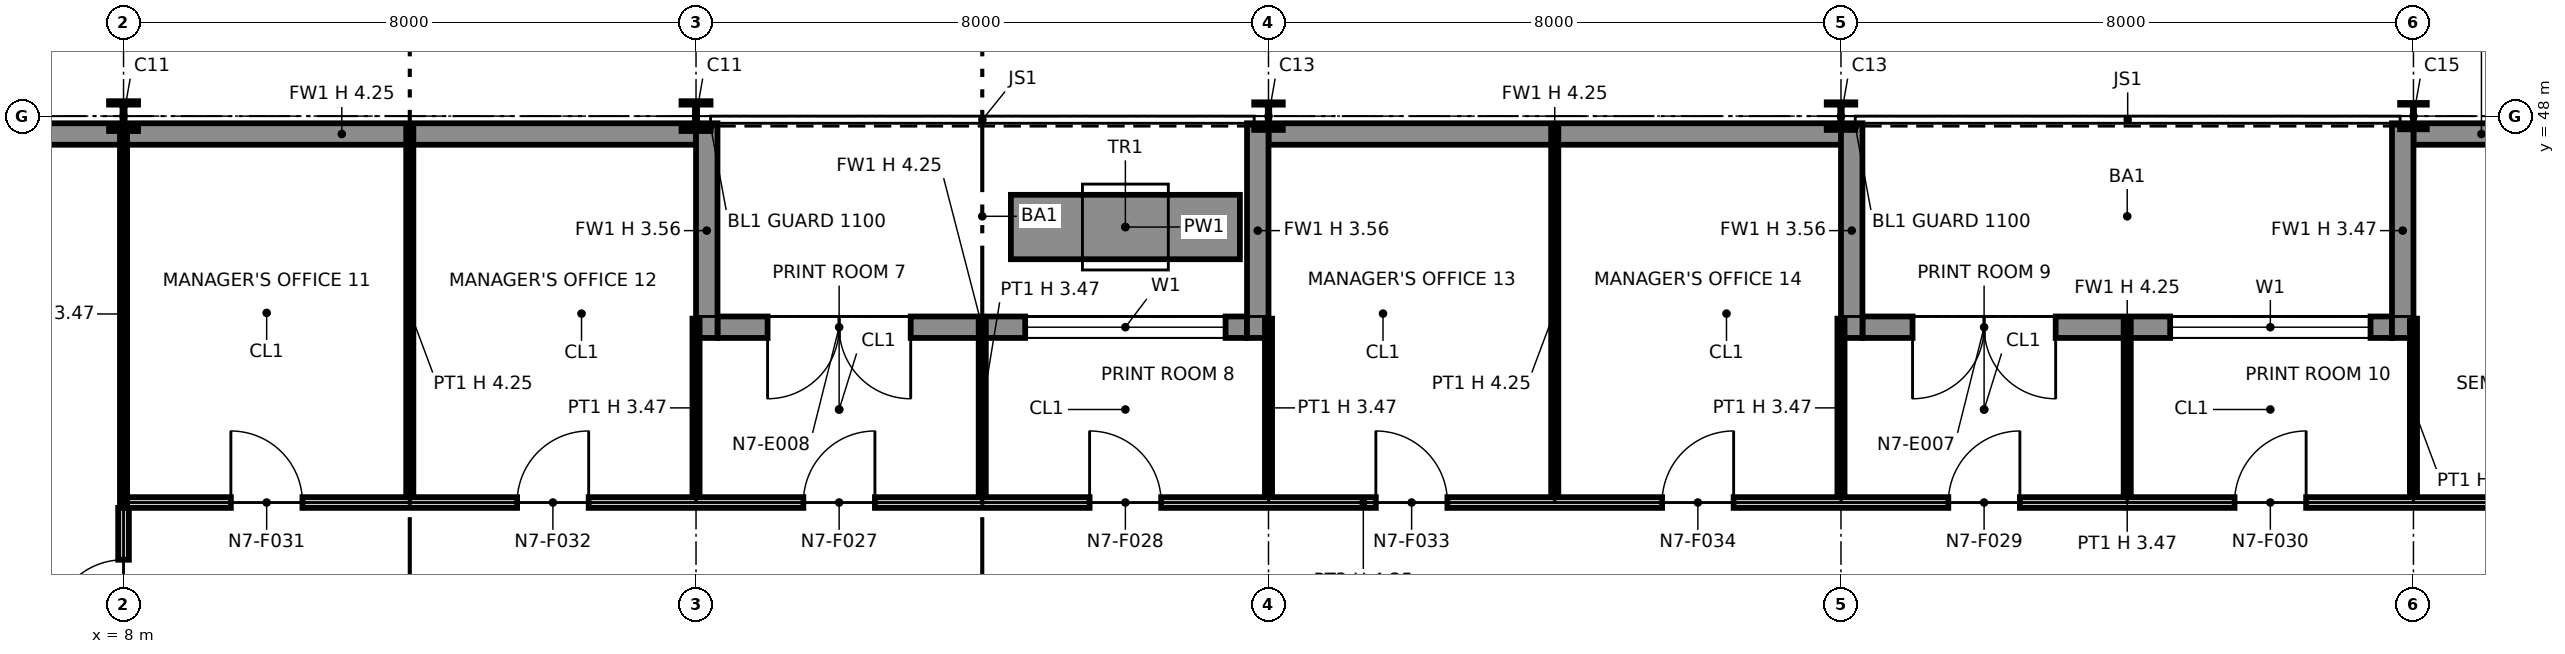
"""IFC4 building model, lengths in metres.
Left out: names, types, materials, properties, quantities, classifications, styles, units other than length and angle.
Written with IfcOpenShell. Run it as: python <this file> out.ifc"""

import sys

from ifc_helpers import new_model, si_unit, direction, frame, frame_2d, origin, origin_2d, place, context, subcontext, project, spatial, polyline, rectangle, i_section, outline, extrude, element, fill, save


model = new_model("IFC4")
c1 = context("Model", 3, precision=1e-05, world=origin(), true_north=direction((0.0, 1.0)))
c2 = subcontext(c1, "Body", "Model", "MODEL_VIEW")
j1 = project(units=[si_unit("LENGTHUNIT", "METRE"), si_unit("PLANEANGLEUNIT", "RADIAN")], contexts=[c1])
p1 = place(None, origin())
s1 = spatial("IfcSite", under=j1, at=p1, CompositionType="ELEMENT")
p2 = place(p1, origin())
s2 = spatial("IfcBuilding", under=s1, at=p2, CompositionType="ELEMENT")
p3 = place(p2, frame((0.0, 0.0, 105.2)))
s3 = spatial("IfcBuildingStorey", under=s2, at=p3, CompositionType="ELEMENT", Elevation=105.2)
for number, where, z_axis, x_axis in (
    (1, (8.0, 48.0, 0.0), (0.0, 0.0, 1.0), (1.0, 0.0, 0.0)),
    (2, (16.0, 48.0, 0.0), (0.0, 0.0, 1.0), (1.0, 0.0, 0.0)),
):
    element("IfcColumn", number, at=place(p3, frame(where, z_axis=z_axis, x_axis=x_axis)), inside=s3, PredefinedType="COLUMN", context=c2, shape_type="SweptSolid", body=[
        extrude(i_section(OverallWidth=0.406, OverallDepth=0.417, WebThickness=0.03, FlangeThickness=0.048, at=origin_2d()), origin(), (0.0, 0.0, 1.0), 4.25),
    ])
for number, where, z_axis, x_axis in (
    (3, (24.0, 48.0, 0.0), (0.0, 0.0, 1.0), (1.0, 0.0, 0.0)),
    (4, (32.0, 48.0, 0.0), (0.0, 0.0, 1.0), (1.0, 0.0, 0.0)),
):
    element("IfcColumn", number, at=place(p3, frame(where, z_axis=z_axis, x_axis=x_axis)), inside=s3, PredefinedType="COLUMN", context=c2, shape_type="SweptSolid", body=[
        extrude(i_section(OverallWidth=0.399, OverallDepth=0.386, WebThickness=0.021, FlangeThickness=0.033, at=origin_2d()), origin(), (0.0, 0.0, 1.0), 4.25),
    ])
p4 = place(p3, frame((40.0, 48.0, 0.0), z_axis=(0.0, 0.0, 1.0), x_axis=(1.0, 0.0, 0.0)))
e5 = element("IfcColumn", 5, at=p4, inside=s3, PredefinedType="COLUMN", context=c2, shape_type="SweptSolid", body=[
    extrude(i_section(OverallWidth=0.373, OverallDepth=0.368, WebThickness=0.015, FlangeThickness=0.024, at=origin_2d()), origin(), (0.0, 0.0, 1.0), 4.25),
])
p5 = place(p3, frame((41.9, 47.75, 0.0), z_axis=(0.0, 0.0, 1.0), x_axis=(-1.0, 0.0, 0.0)))
e6 = element("IfcWall", 6, at=p5, inside=s3, PredefinedType="SOLIDWALL", context=c2, shape_type="SweptSolid", body=[
    extrude(rectangle(XDim=1.9, YDim=0.3, at=frame_2d((0.95, 0.0))), origin(), (0.0, 0.0, 1.0), 4.25),
])
p6 = place(p3, frame((39.7, 45.05, 0.0), z_axis=(0.0, 0.0, 1.0), x_axis=(-1.0, 0.0, 0.0)))
e7 = element("IfcWall", 7, at=p6, inside=s3, PredefinedType="SOLIDWALL", context=c2, shape_type="SweptSolid", body=[
    extrude(rectangle(XDim=7.4, YDim=0.3, at=frame_2d((3.7, 0.0))), origin(), (0.0, 0.0, 1.0), 4.25),
])
p7 = place(p6, frame((0.3, 0.0, 0.9)))
e8 = element("IfcOpeningElement", 8, at=p7, cuts=e7, PredefinedType="OPENING", context=c2, shape_type="SweptSolid", body=[
    extrude(rectangle(XDim=2.8, YDim=2.2, at=frame_2d((1.4, 1.1))), frame((0.0, 0.16, 0.0), z_axis=(0.0, -1.0, 0.0), x_axis=(1.0, 0.0, 0.0)), (0.0, 0.0, 1.0), 0.32),
])
p8 = place(p6, frame((4.7, 0.0, 0.0)))
e9 = element("IfcOpeningElement", 9, at=p8, cuts=e7, PredefinedType="OPENING", context=c2, shape_type="SweptSolid", body=[
    extrude(rectangle(XDim=2.0, YDim=2.4, at=frame_2d((1.0, 1.2))), frame((0.0, 0.16, 0.0), z_axis=(0.0, -1.0, 0.0), x_axis=(1.0, 0.0, 0.0)), (0.0, 0.0, 1.0), 0.32),
])
p9 = place(p3, frame((39.85, 47.9, 0.0), z_axis=(0.0, 0.0, 1.0), x_axis=(0.0, -1.0, 0.0)))
e10 = element("IfcWall", 10, at=p9, inside=s3, PredefinedType="SOLIDWALL", context=c2, shape_type="SweptSolid", body=[
    extrude(rectangle(XDim=3.0, YDim=0.3, at=frame_2d((1.5, 0.0))), origin(), (0.0, 0.0, 1.0), 3.469),
])
p10 = place(p3, frame((32.15, 47.9, 0.0), z_axis=(0.0, 0.0, 1.0), x_axis=(0.0, -1.0, 0.0)))
e11 = element("IfcWall", 11, at=p10, inside=s3, PredefinedType="SOLIDWALL", context=c2, shape_type="SweptSolid", body=[
    extrude(rectangle(XDim=3.0, YDim=0.3, at=frame_2d((1.5, 0.0))), origin(), (0.0, 0.0, 1.0), 3.556),
])
p11 = place(p3, frame((32.0, 47.75, 0.0), z_axis=(0.0, 0.0, 1.0), x_axis=(-1.0, 0.0, 0.0)))
e12 = element("IfcWall", 12, at=p11, inside=s3, PredefinedType="SOLIDWALL", context=c2, shape_type="SweptSolid", body=[
    extrude(rectangle(XDim=8.0, YDim=0.3, at=frame_2d((4.0, 0.0))), origin(), (0.0, 0.0, 1.0), 4.25),
])
p12 = place(p3, frame((23.7, 45.05, 0.0), z_axis=(0.0, 0.0, 1.0), x_axis=(-1.0, 0.0, 0.0)))
e13 = element("IfcWall", 13, at=p12, inside=s3, PredefinedType="SOLIDWALL", context=c2, shape_type="SweptSolid", body=[
    extrude(rectangle(XDim=7.4, YDim=0.3, at=frame_2d((3.7, 0.0))), origin(), (0.0, 0.0, 1.0), 4.25),
])
p13 = place(p12, frame((0.3, 0.0, 0.9)))
e14 = element("IfcOpeningElement", 14, at=p13, cuts=e13, PredefinedType="OPENING", context=c2, shape_type="SweptSolid", body=[
    extrude(rectangle(XDim=2.8, YDim=2.2, at=frame_2d((1.4, 1.1))), frame((0.0, 0.16, 0.0), z_axis=(0.0, -1.0, 0.0), x_axis=(1.0, 0.0, 0.0)), (0.0, 0.0, 1.0), 0.32),
])
p14 = place(p12, frame((4.7, 0.0, 0.0)))
e15 = element("IfcOpeningElement", 15, at=p14, cuts=e13, PredefinedType="OPENING", context=c2, shape_type="SweptSolid", body=[
    extrude(rectangle(XDim=2.0, YDim=2.4, at=frame_2d((1.0, 1.2))), frame((0.0, 0.16, 0.0), z_axis=(0.0, -1.0, 0.0), x_axis=(1.0, 0.0, 0.0)), (0.0, 0.0, 1.0), 0.32),
])
for number, where, z_axis, x_axis in (
    (16, (23.85, 47.9, 0.0), (0.0, 0.0, 1.0), (0.0, -1.0, 0.0)),
    (17, (16.15, 47.9, 0.0), (0.0, 0.0, 1.0), (0.0, -1.0, 0.0)),
):
    element("IfcWall", number, at=place(p3, frame(where, z_axis=z_axis, x_axis=x_axis)), inside=s3, PredefinedType="SOLIDWALL", context=c2, shape_type="SweptSolid", body=[
        extrude(rectangle(XDim=3.0, YDim=0.3, at=frame_2d((1.5, 0.0))), origin(), (0.0, 0.0, 1.0), 3.556),
    ])
p15 = place(p3, frame((16.0, 47.75, 0.0), z_axis=(0.0, 0.0, 1.0), x_axis=(-1.0, 0.0, 0.0)))
e18 = element("IfcWall", 18, at=p15, inside=s3, PredefinedType="SOLIDWALL", context=c2, shape_type="SweptSolid", body=[
    extrude(rectangle(XDim=9.9, YDim=0.3, at=frame_2d((4.95, 0.0))), origin(), (0.0, 0.0, 1.0), 4.25),
])
p16 = place(p3, frame((23.6, 46.45, 0.0), z_axis=(0.0, 0.0, 1.0), x_axis=(-1.0, 0.0, 0.0)))
e19 = element("IfcWall", 19, at=p16, inside=s3, PredefinedType="SOLIDWALL", context=c2, shape_type="SweptSolid", body=[
    extrude(rectangle(XDim=3.2, YDim=0.9, at=frame_2d((1.6, 0.0))), origin(), (0.0, 0.0, 1.0), 0.6),
])
p17 = place(p3, frame((8.0, 40.03, 0.0), z_axis=(0.0, 0.0, 1.0), x_axis=(0.0, 1.0, 0.0)))
e20 = element("IfcWall", 20, at=p17, inside=s3, PredefinedType="PARTITIONING", context=c2, shape_type="SweptSolid", body=[
    extrude(rectangle(XDim=2.495, YDim=0.15, at=frame_2d((1.248, 0.0))), origin(), (0.0, 0.0, 1.0), 3.47),
])
p18 = place(p17, frame((0.77, 0.0, 0.0)))
e21 = element("IfcOpeningElement", 21, at=p18, cuts=e20, PredefinedType="OPENING", context=c2, shape_type="SweptSolid", body=[
    extrude(rectangle(XDim=1.0, YDim=2.1, at=frame_2d((0.5, 1.05))), frame((0.0, 0.085, 0.0), z_axis=(0.0, -1.0, 0.0), x_axis=(1.0, 0.0, 0.0)), (0.0, 0.0, 1.0), 0.17),
])
p19 = place(p3, frame((8.05, 42.6, 0.0), z_axis=(0.0, 0.0, 1.0), x_axis=(1.0, 0.0, 0.0)))
e22 = element("IfcWall", 22, at=p19, inside=s3, PredefinedType="PARTITIONING", context=c2, shape_type="SweptSolid", body=[
    extrude(rectangle(XDim=34.55, YDim=0.15, at=frame_2d((17.275, 0.0))), origin(), (0.0, 0.0, 1.0), 4.25),
])
p20 = place(p19, frame((9.45, 0.0, 0.0)))
e23 = element("IfcOpeningElement", 23, at=p20, cuts=e22, PredefinedType="OPENING", context=c2, shape_type="SweptSolid", body=[
    extrude(rectangle(XDim=1.0, YDim=2.1, at=frame_2d((0.5, 1.05))), frame((0.0, 0.085, 0.0), z_axis=(0.0, -1.0, 0.0), x_axis=(1.0, 0.0, 0.0)), (0.0, 0.0, 1.0), 0.17),
])
p21 = place(p19, frame((13.45, 0.0, 0.0)))
e24 = element("IfcOpeningElement", 24, at=p21, cuts=e22, PredefinedType="OPENING", context=c2, shape_type="SweptSolid", body=[
    extrude(rectangle(XDim=1.0, YDim=2.1, at=frame_2d((0.5, 1.05))), frame((0.0, 0.085, 0.0), z_axis=(0.0, -1.0, 0.0), x_axis=(1.0, 0.0, 0.0)), (0.0, 0.0, 1.0), 0.17),
])
p22 = place(p19, frame((25.45, 0.0, 0.0)))
e25 = element("IfcOpeningElement", 25, at=p22, cuts=e22, PredefinedType="OPENING", context=c2, shape_type="SweptSolid", body=[
    extrude(rectangle(XDim=1.0, YDim=2.1, at=frame_2d((0.5, 1.05))), frame((0.0, 0.085, 0.0), z_axis=(0.0, -1.0, 0.0), x_axis=(1.0, 0.0, 0.0)), (0.0, 0.0, 1.0), 0.17),
])
p23 = place(p19, frame((29.45, 0.0, 0.0)))
e26 = element("IfcOpeningElement", 26, at=p23, cuts=e22, PredefinedType="OPENING", context=c2, shape_type="SweptSolid", body=[
    extrude(rectangle(XDim=1.0, YDim=2.1, at=frame_2d((0.5, 1.05))), frame((0.0, 0.085, 0.0), z_axis=(0.0, -1.0, 0.0), x_axis=(1.0, 0.0, 0.0)), (0.0, 0.0, 1.0), 0.17),
])
p24 = place(p19, frame((1.45, 0.0, 0.0)))
e27 = element("IfcOpeningElement", 27, at=p24, cuts=e22, PredefinedType="OPENING", context=c2, shape_type="SweptSolid", body=[
    extrude(rectangle(XDim=1.0, YDim=2.1, at=frame_2d((0.5, 1.05))), frame((0.0, 0.085, 0.0), z_axis=(0.0, -1.0, 0.0), x_axis=(1.0, 0.0, 0.0)), (0.0, 0.0, 1.0), 0.17),
])
p25 = place(p19, frame((5.45, 0.0, 0.0)))
e28 = element("IfcOpeningElement", 28, at=p25, cuts=e22, PredefinedType="OPENING", context=c2, shape_type="SweptSolid", body=[
    extrude(rectangle(XDim=1.0, YDim=2.1, at=frame_2d((0.5, 1.05))), frame((0.0, 0.085, 0.0), z_axis=(0.0, -1.0, 0.0), x_axis=(1.0, 0.0, 0.0)), (0.0, 0.0, 1.0), 0.17),
])
p26 = place(p19, frame((17.45, 0.0, 0.0)))
e29 = element("IfcOpeningElement", 29, at=p26, cuts=e22, PredefinedType="OPENING", context=c2, shape_type="SweptSolid", body=[
    extrude(rectangle(XDim=1.0, YDim=2.1, at=frame_2d((0.5, 1.05))), frame((0.0, 0.085, 0.0), z_axis=(0.0, -1.0, 0.0), x_axis=(1.0, 0.0, 0.0)), (0.0, 0.0, 1.0), 0.17),
])
p27 = place(p19, frame((21.45, 0.0, 0.0)))
e30 = element("IfcOpeningElement", 30, at=p27, cuts=e22, PredefinedType="OPENING", context=c2, shape_type="SweptSolid", body=[
    extrude(rectangle(XDim=1.0, YDim=2.1, at=frame_2d((0.5, 1.05))), frame((0.0, 0.085, 0.0), z_axis=(0.0, -1.0, 0.0), x_axis=(1.0, 0.0, 0.0)), (0.0, 0.0, 1.0), 0.17),
])
p28 = place(p3, frame((8.0, 42.6, 0.0), z_axis=(0.0, 0.0, 1.0), x_axis=(0.0, 1.0, 0.0)))
e31 = element("IfcWall", 31, at=p28, inside=s3, PredefinedType="PARTITIONING", context=c2, shape_type="SweptSolid", body=[
    extrude(rectangle(XDim=5.27, YDim=0.1, at=frame_2d((2.635, 0.0))), origin(), (0.0, 0.0, 1.0), 3.47),
])
p29 = place(p3, frame((12.0, 42.675, 0.0), z_axis=(0.0, 0.0, 1.0), x_axis=(0.0, 1.0, 0.0)))
e32 = element("IfcWall", 32, at=p29, inside=s3, PredefinedType="PARTITIONING", context=c2, shape_type="SweptSolid", body=[
    extrude(outline(polyline([(0.0, 0.0), (5.195, 0.0), (5.195, 4.25), (1.625, 4.25), (1.623, 3.47), (1.027, 3.47), (1.025, 4.25), (0.0, 4.25), (0.0, 0.0)])), frame((0.0, 0.05, 0.0), z_axis=(0.0, -1.0, 0.0), x_axis=(1.0, 0.0, 0.0)), (0.0, 0.0, 1.0), 0.1),
])
for number, where, z_axis, x_axis in (
    (33, (16.0, 42.675, 0.0), (0.0, 0.0, 1.0), (0.0, 1.0, 0.0)),
    (34, (20.0, 42.675, 0.0), (0.0, 0.0, 1.0), (0.0, 1.0, 0.0)),
    (35, (24.0, 42.675, 0.0), (0.0, 0.0, 1.0), (0.0, 1.0, 0.0)),
):
    element("IfcWall", number, at=place(p3, frame(where, z_axis=z_axis, x_axis=x_axis)), inside=s3, PredefinedType="PARTITIONING", context=c2, shape_type="SweptSolid", body=[
        extrude(rectangle(XDim=2.495, YDim=0.1, at=frame_2d((1.248, 0.0))), origin(), (0.0, 0.0, 1.0), 3.47),
    ])
p30 = place(p3, frame((28.0, 42.675, 0.0), z_axis=(0.0, 0.0, 1.0), x_axis=(0.0, 1.0, 0.0)))
e36 = element("IfcWall", 36, at=p30, inside=s3, PredefinedType="PARTITIONING", context=c2, shape_type="SweptSolid", body=[
    extrude(outline(polyline([(0.0, 0.0), (5.195, 0.0), (5.195, 4.25), (1.625, 4.25), (1.623, 3.47), (1.027, 3.47), (1.025, 4.25), (0.0, 4.25), (0.0, 0.0)])), frame((0.0, 0.05, 0.0), z_axis=(0.0, -1.0, 0.0), x_axis=(1.0, 0.0, 0.0)), (0.0, 0.0, 1.0), 0.1),
])
for number, where, z_axis, x_axis in (
    (37, (32.0, 42.675, 0.0), (0.0, 0.0, 1.0), (0.0, 1.0, 0.0)),
    (38, (36.0, 42.675, 0.0), (0.0, 0.0, 1.0), (0.0, 1.0, 0.0)),
    (39, (40.0, 42.675, 0.0), (0.0, 0.0, 1.0), (0.0, 1.0, 0.0)),
):
    element("IfcWall", number, at=place(p3, frame(where, z_axis=z_axis, x_axis=x_axis)), inside=s3, PredefinedType="PARTITIONING", context=c2, shape_type="SweptSolid", body=[
        extrude(rectangle(XDim=2.495, YDim=0.1, at=frame_2d((1.248, 0.0))), origin(), (0.0, 0.0, 1.0), 3.47),
    ])
p31 = place(p7, origin())
e40 = element("IfcWindow", 40, at=p31, inside=s3, PartitioningType="SINGLE_PANEL", PredefinedType="WINDOW", context=c2, shape_type="SweptSolid", body=[
    extrude(rectangle(XDim=2.8, YDim=2.2, at=frame_2d((1.4, 1.1))), frame((0.0, 0.03, 0.0), z_axis=(0.0, -1.0, 0.0), x_axis=(1.0, 0.0, 0.0)), (0.0, 0.0, 1.0), 0.06),
])
fill(e8, e40)
p32 = place(p8, origin())
e41 = element("IfcDoor", 41, at=p32, inside=s3, OperationType="DOUBLE_DOOR_SINGLE_SWING", PredefinedType="DOOR", context=c2, shape_type="SweptSolid", body=[
    extrude(rectangle(XDim=2.0, YDim=2.4, at=frame_2d((1.0, 1.2))), frame((0.0, 0.025, 0.0), z_axis=(0.0, -1.0, 0.0), x_axis=(1.0, 0.0, 0.0)), (0.0, 0.0, 1.0), 0.05),
])
fill(e9, e41)
p33 = place(p13, origin())
e42 = element("IfcWindow", 42, at=p33, inside=s3, PartitioningType="SINGLE_PANEL", PredefinedType="WINDOW", context=c2, shape_type="SweptSolid", body=[
    extrude(rectangle(XDim=2.8, YDim=2.2, at=frame_2d((1.4, 1.1))), frame((0.0, 0.03, 0.0), z_axis=(0.0, -1.0, 0.0), x_axis=(1.0, 0.0, 0.0)), (0.0, 0.0, 1.0), 0.06),
])
fill(e14, e42)
p34 = place(p14, origin())
e43 = element("IfcDoor", 43, at=p34, inside=s3, OperationType="DOUBLE_DOOR_SINGLE_SWING", PredefinedType="DOOR", context=c2, shape_type="SweptSolid", body=[
    extrude(rectangle(XDim=2.0, YDim=2.4, at=frame_2d((1.0, 1.2))), frame((0.0, 0.025, 0.0), z_axis=(0.0, -1.0, 0.0), x_axis=(1.0, 0.0, 0.0)), (0.0, 0.0, 1.0), 0.05),
])
fill(e15, e43)
p35 = place(p18, origin())
e44 = element("IfcDoor", 44, at=p35, inside=s3, OperationType="SINGLE_SWING_LEFT", PredefinedType="DOOR", context=c2, shape_type="SweptSolid", body=[
    extrude(rectangle(XDim=1.0, YDim=2.1, at=frame_2d((0.5, 1.05))), frame((0.0, 0.025, 0.0), z_axis=(0.0, -1.0, 0.0), x_axis=(1.0, 0.0, 0.0)), (0.0, 0.0, 1.0), 0.05),
])
fill(e21, e44)
p36 = place(p20, origin())
e45 = element("IfcDoor", 45, at=p36, inside=s3, OperationType="SINGLE_SWING_RIGHT", PredefinedType="DOOR", context=c2, shape_type="SweptSolid", body=[
    extrude(rectangle(XDim=1.0, YDim=2.1, at=frame_2d((0.5, 1.05))), frame((0.0, 0.025, 0.0), z_axis=(0.0, -1.0, 0.0), x_axis=(1.0, 0.0, 0.0)), (0.0, 0.0, 1.0), 0.05),
])
fill(e23, e45)
p37 = place(p21, origin())
e46 = element("IfcDoor", 46, at=p37, inside=s3, OperationType="SINGLE_SWING_LEFT", PredefinedType="DOOR", context=c2, shape_type="SweptSolid", body=[
    extrude(rectangle(XDim=1.0, YDim=2.1, at=frame_2d((0.5, 1.05))), frame((0.0, 0.025, 0.0), z_axis=(0.0, -1.0, 0.0), x_axis=(1.0, 0.0, 0.0)), (0.0, 0.0, 1.0), 0.05),
])
fill(e24, e46)
p38 = place(p22, origin())
e47 = element("IfcDoor", 47, at=p38, inside=s3, OperationType="SINGLE_SWING_RIGHT", PredefinedType="DOOR", context=c2, shape_type="SweptSolid", body=[
    extrude(rectangle(XDim=1.0, YDim=2.1, at=frame_2d((0.5, 1.05))), frame((0.0, 0.025, 0.0), z_axis=(0.0, -1.0, 0.0), x_axis=(1.0, 0.0, 0.0)), (0.0, 0.0, 1.0), 0.05),
])
fill(e25, e47)
p39 = place(p23, origin())
e48 = element("IfcDoor", 48, at=p39, inside=s3, OperationType="SINGLE_SWING_RIGHT", PredefinedType="DOOR", context=c2, shape_type="SweptSolid", body=[
    extrude(rectangle(XDim=1.0, YDim=2.1, at=frame_2d((0.5, 1.05))), frame((0.0, 0.025, 0.0), z_axis=(0.0, -1.0, 0.0), x_axis=(1.0, 0.0, 0.0)), (0.0, 0.0, 1.0), 0.05),
])
fill(e26, e48)
p40 = place(p24, origin())
e49 = element("IfcDoor", 49, at=p40, inside=s3, OperationType="SINGLE_SWING_LEFT", PredefinedType="DOOR", context=c2, shape_type="SweptSolid", body=[
    extrude(rectangle(XDim=1.0, YDim=2.1, at=frame_2d((0.5, 1.05))), frame((0.0, 0.025, 0.0), z_axis=(0.0, -1.0, 0.0), x_axis=(1.0, 0.0, 0.0)), (0.0, 0.0, 1.0), 0.05),
])
fill(e27, e49)
p41 = place(p25, origin())
e50 = element("IfcDoor", 50, at=p41, inside=s3, OperationType="SINGLE_SWING_RIGHT", PredefinedType="DOOR", context=c2, shape_type="SweptSolid", body=[
    extrude(rectangle(XDim=1.0, YDim=2.1, at=frame_2d((0.5, 1.05))), frame((0.0, 0.025, 0.0), z_axis=(0.0, -1.0, 0.0), x_axis=(1.0, 0.0, 0.0)), (0.0, 0.0, 1.0), 0.05),
])
fill(e28, e50)
p42 = place(p26, origin())
e51 = element("IfcDoor", 51, at=p42, inside=s3, OperationType="SINGLE_SWING_LEFT", PredefinedType="DOOR", context=c2, shape_type="SweptSolid", body=[
    extrude(rectangle(XDim=1.0, YDim=2.1, at=frame_2d((0.5, 1.05))), frame((0.0, 0.025, 0.0), z_axis=(0.0, -1.0, 0.0), x_axis=(1.0, 0.0, 0.0)), (0.0, 0.0, 1.0), 0.05),
])
fill(e29, e51)
p43 = place(p27, origin())
e52 = element("IfcDoor", 52, at=p43, inside=s3, OperationType="SINGLE_SWING_RIGHT", PredefinedType="DOOR", context=c2, shape_type="SweptSolid", body=[
    extrude(rectangle(XDim=1.0, YDim=2.1, at=frame_2d((0.5, 1.05))), frame((0.0, 0.025, 0.0), z_axis=(0.0, -1.0, 0.0), x_axis=(1.0, 0.0, 0.0)), (0.0, 0.0, 1.0), 0.05),
])
fill(e30, e52)
save(model, sys.argv[1])
